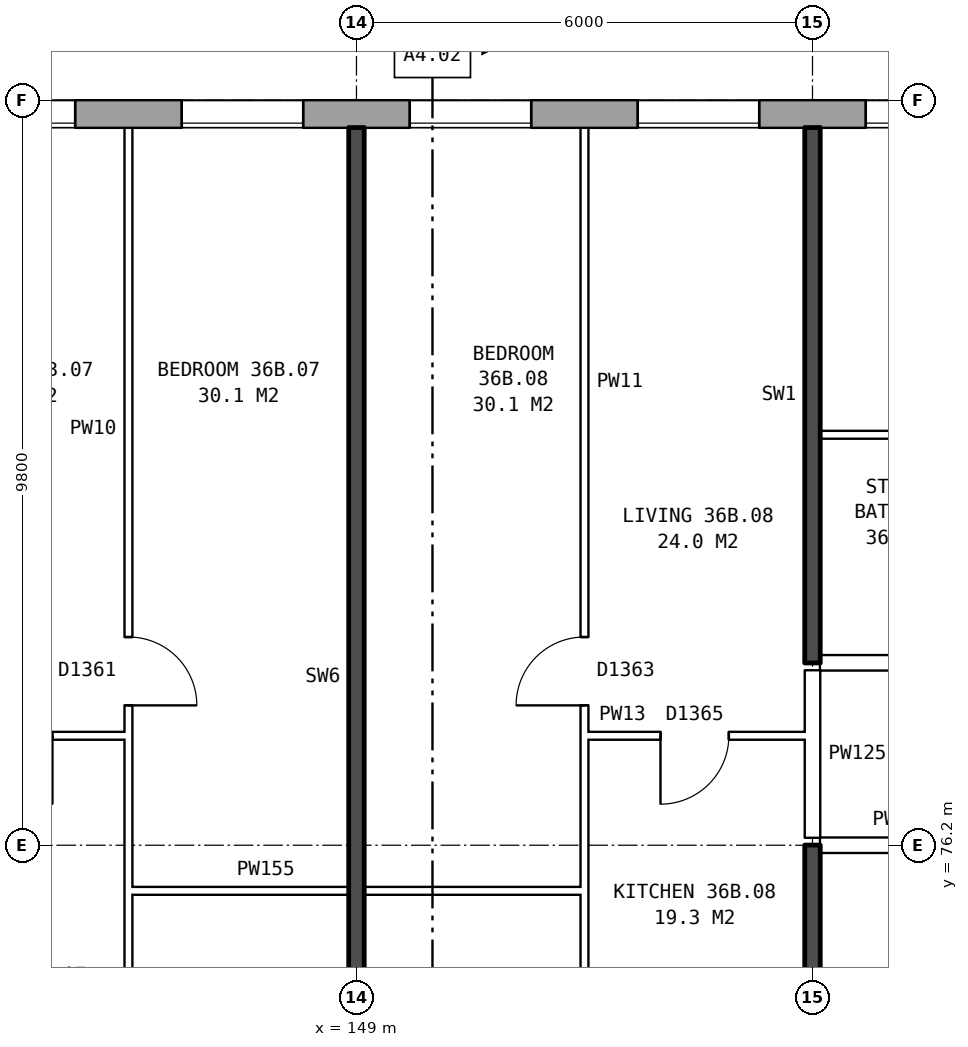
"""IFC4 building model, lengths in metres.
Left out: names, types, materials, properties, quantities, classifications, styles, units other than length and angle.
Written with IfcOpenShell. Run it as: python <this file> out.ifc"""

import sys

from ifc_helpers import new_model, si_unit, direction, frame, frame_2d, origin, place, context, subcontext, project, spatial, rectangle, extrude, element, fill, save


model = new_model("IFC4")
c1 = context("Model", 3, precision=1e-05, world=origin(), true_north=direction((0.0, 1.0)))
c2 = subcontext(c1, "Body", "Model", "MODEL_VIEW")
j1 = project(units=[si_unit("LENGTHUNIT", "METRE"), si_unit("PLANEANGLEUNIT", "RADIAN")], contexts=[c1])
p1 = place(None, origin())
s1 = spatial("IfcSite", under=j1, at=p1, CompositionType="ELEMENT")
p2 = place(p1, origin())
s2 = spatial("IfcBuilding", under=s1, at=p2, CompositionType="ELEMENT")
p3 = place(p2, frame((0.0, 0.0, 129.9)))
s3 = spatial("IfcBuildingStorey", under=s2, at=p3, CompositionType="ELEMENT", Elevation=129.9)
p4 = place(p3, frame((169.675, 85.82, 0.0), z_axis=(0.0, 0.0, 1.0), x_axis=(-1.0, 0.0, 0.0)))
e1 = element("IfcWall", 1, at=p4, inside=s3, PredefinedType="STANDARD", context=c2, shape_type="SweptSolid", body=[
    extrude(rectangle(XDim=35.601, YDim=0.36, at=frame_2d((17.8, 0.0))), origin(), (0.0, 0.0, 1.0), 2.85),
])
p5 = place(p4, frame((0.375, 0.0, 0.8)))
e2 = element("IfcOpeningElement", 2, at=p5, cuts=e1, PredefinedType="OPENING", context=c2, shape_type="SweptSolid", body=[
    extrude(rectangle(XDim=1.6, YDim=1.8, at=frame_2d((0.8, 0.9))), frame((0.0, 0.19, 0.0), z_axis=(0.0, -1.0, 0.0), x_axis=(1.0, 0.0, 0.0)), (0.0, 0.0, 1.0), 0.38),
])
p6 = place(p4, frame((3.375, 0.0, 0.8)))
e3 = element("IfcOpeningElement", 3, at=p6, cuts=e1, PredefinedType="OPENING", context=c2, shape_type="SweptSolid", body=[
    extrude(rectangle(XDim=1.6, YDim=1.8, at=frame_2d((0.8, 0.9))), frame((0.0, 0.19, 0.0), z_axis=(0.0, -1.0, 0.0), x_axis=(1.0, 0.0, 0.0)), (0.0, 0.0, 1.0), 0.38),
])
p7 = place(p4, frame((5.275, 0.0, 0.8)))
e4 = element("IfcOpeningElement", 4, at=p7, cuts=e1, PredefinedType="OPENING", context=c2, shape_type="SweptSolid", body=[
    extrude(rectangle(XDim=1.6, YDim=1.8, at=frame_2d((0.8, 0.9))), frame((0.0, 0.19, 0.0), z_axis=(0.0, -1.0, 0.0), x_axis=(1.0, 0.0, 0.0)), (0.0, 0.0, 1.0), 0.38),
])
p8 = place(p4, frame((9.375, 0.0, 0.8)))
e5 = element("IfcOpeningElement", 5, at=p8, cuts=e1, PredefinedType="OPENING", context=c2, shape_type="SweptSolid", body=[
    extrude(rectangle(XDim=1.6, YDim=1.8, at=frame_2d((0.8, 0.9))), frame((0.0, 0.19, 0.0), z_axis=(0.0, -1.0, 0.0), x_axis=(1.0, 0.0, 0.0)), (0.0, 0.0, 1.0), 0.38),
])
p9 = place(p4, frame((12.375, 0.0, 0.8)))
e6 = element("IfcOpeningElement", 6, at=p9, cuts=e1, PredefinedType="OPENING", context=c2, shape_type="SweptSolid", body=[
    extrude(rectangle(XDim=1.6, YDim=1.8, at=frame_2d((0.8, 0.9))), frame((0.0, 0.19, 0.0), z_axis=(0.0, -1.0, 0.0), x_axis=(1.0, 0.0, 0.0)), (0.0, 0.0, 1.0), 0.38),
])
p10 = place(p4, frame((15.375, 0.0, 0.8)))
e7 = element("IfcOpeningElement", 7, at=p10, cuts=e1, PredefinedType="OPENING", context=c2, shape_type="SweptSolid", body=[
    extrude(rectangle(XDim=1.6, YDim=1.8, at=frame_2d((0.8, 0.9))), frame((0.0, 0.19, 0.0), z_axis=(0.0, -1.0, 0.0), x_axis=(1.0, 0.0, 0.0)), (0.0, 0.0, 1.0), 0.38),
])
p11 = place(p4, frame((18.375, 0.0, 0.8)))
e8 = element("IfcOpeningElement", 8, at=p11, cuts=e1, PredefinedType="OPENING", context=c2, shape_type="SweptSolid", body=[
    extrude(rectangle(XDim=1.6, YDim=1.8, at=frame_2d((0.8, 0.9))), frame((0.0, 0.19, 0.0), z_axis=(0.0, -1.0, 0.0), x_axis=(1.0, 0.0, 0.0)), (0.0, 0.0, 1.0), 0.38),
])
p12 = place(p4, frame((21.375, 0.0, 0.8)))
e9 = element("IfcOpeningElement", 9, at=p12, cuts=e1, PredefinedType="OPENING", context=c2, shape_type="SweptSolid", body=[
    extrude(rectangle(XDim=1.6, YDim=1.8, at=frame_2d((0.8, 0.9))), frame((0.0, 0.19, 0.0), z_axis=(0.0, -1.0, 0.0), x_axis=(1.0, 0.0, 0.0)), (0.0, 0.0, 1.0), 0.38),
])
p13 = place(p4, frame((24.375, 0.0, 0.8)))
e10 = element("IfcOpeningElement", 10, at=p13, cuts=e1, PredefinedType="OPENING", context=c2, shape_type="SweptSolid", body=[
    extrude(rectangle(XDim=1.6, YDim=1.8, at=frame_2d((0.8, 0.9))), frame((0.0, 0.19, 0.0), z_axis=(0.0, -1.0, 0.0), x_axis=(1.0, 0.0, 0.0)), (0.0, 0.0, 1.0), 0.38),
])
p14 = place(p4, frame((27.825, 0.0, 1.7)))
e11 = element("IfcOpeningElement", 11, at=p14, cuts=e1, PredefinedType="OPENING", context=c2, shape_type="SweptSolid", body=[
    extrude(rectangle(XDim=0.6, YDim=0.9, at=frame_2d((0.3, 0.45))), frame((0.0, 0.19, 0.0), z_axis=(0.0, -1.0, 0.0), x_axis=(1.0, 0.0, 0.0)), (0.0, 0.0, 1.0), 0.38),
])
p15 = place(p4, frame((30.375, 0.0, 0.8)))
e12 = element("IfcOpeningElement", 12, at=p15, cuts=e1, PredefinedType="OPENING", context=c2, shape_type="SweptSolid", body=[
    extrude(rectangle(XDim=1.6, YDim=1.8, at=frame_2d((0.8, 0.9))), frame((0.0, 0.19, 0.0), z_axis=(0.0, -1.0, 0.0), x_axis=(1.0, 0.0, 0.0)), (0.0, 0.0, 1.0), 0.38),
])
p16 = place(p4, frame((33.375, 0.0, 0.8)))
e13 = element("IfcOpeningElement", 13, at=p16, cuts=e1, PredefinedType="OPENING", context=c2, shape_type="SweptSolid", body=[
    extrude(rectangle(XDim=1.6, YDim=1.8, at=frame_2d((0.8, 0.9))), frame((0.0, 0.19, 0.0), z_axis=(0.0, -1.0, 0.0), x_axis=(1.0, 0.0, 0.0)), (0.0, 0.0, 1.0), 0.38),
])
p17 = place(p4, frame((7.175, 0.0, 1.7)))
e14 = element("IfcOpeningElement", 14, at=p17, cuts=e1, PredefinedType="OPENING", context=c2, shape_type="SweptSolid", body=[
    extrude(rectangle(XDim=0.6, YDim=0.9, at=frame_2d((0.3, 0.45))), frame((0.0, 0.19, 0.0), z_axis=(0.0, -1.0, 0.0), x_axis=(1.0, 0.0, 0.0)), (0.0, 0.0, 1.0), 0.38),
])
p18 = place(p4, frame((28.725, 0.0, 0.8)))
e15 = element("IfcOpeningElement", 15, at=p18, cuts=e1, PredefinedType="OPENING", context=c2, shape_type="SweptSolid", body=[
    extrude(rectangle(XDim=1.2, YDim=1.8, at=frame_2d((0.6, 0.9))), frame((0.0, 0.19, 0.0), z_axis=(0.0, -1.0, 0.0), x_axis=(1.0, 0.0, 0.0)), (0.0, 0.0, 1.0), 0.38),
])
p19 = place(p3, frame((146.0, 75.6, 0.0), z_axis=(0.0, 0.0, 1.0), x_axis=(1.0, 0.0, 0.0)))
e16 = element("IfcWall", 16, at=p19, inside=s3, PredefinedType="PARTITIONING", context=c2, shape_type="SweptSolid", body=[
    extrude(rectangle(XDim=6.0, YDim=0.1, at=frame_2d((3.0, 0.0))), origin(), (0.0, 0.0, 1.0), 2.85),
])
p20 = place(p3, frame((155.1, 76.2, 0.0), z_axis=(0.0, 0.0, 1.0), x_axis=(1.0, 0.0, 0.0)))
e17 = element("IfcWall", 17, at=p20, inside=s3, PredefinedType="PARTITIONING", context=c2, shape_type="SweptSolid", body=[
    extrude(rectangle(XDim=2.14, YDim=0.2, at=frame_2d((1.07, 0.0))), origin(), (0.0, 0.0, 1.0), 2.85),
])
p21 = place(p3, frame((143.1, 77.64, 0.0), z_axis=(0.0, 0.0, 1.0), x_axis=(1.0, 0.0, 0.0)))
e18 = element("IfcWall", 18, at=p21, inside=s3, PredefinedType="PARTITIONING", context=c2, shape_type="SweptSolid", body=[
    extrude(rectangle(XDim=2.9, YDim=0.1, at=frame_2d((1.45, 0.0))), origin(), (0.0, 0.0, 1.0), 2.85),
])
p22 = place(p21, frame((1.0, 0.0, 0.0)))
e19 = element("IfcOpeningElement", 19, at=p22, cuts=e18, PredefinedType="OPENING", context=c2, shape_type="SweptSolid", body=[
    extrude(rectangle(XDim=0.9, YDim=2.1, at=frame_2d((0.45, 1.05))), frame((0.0, 0.06, 0.0), z_axis=(0.0, -1.0, 0.0), x_axis=(1.0, 0.0, 0.0)), (0.0, 0.0, 1.0), 0.12),
])
p23 = place(p3, frame((152.0, 77.64, 0.0), z_axis=(0.0, 0.0, 1.0), x_axis=(1.0, 0.0, 0.0)))
e20 = element("IfcWall", 20, at=p23, inside=s3, PredefinedType="PARTITIONING", context=c2, shape_type="SweptSolid", body=[
    extrude(rectangle(XDim=2.9, YDim=0.1, at=frame_2d((1.45, 0.0))), origin(), (0.0, 0.0, 1.0), 2.85),
])
p24 = place(p23, frame((1.0, 0.0, 0.0)))
e21 = element("IfcOpeningElement", 21, at=p24, cuts=e20, PredefinedType="OPENING", context=c2, shape_type="SweptSolid", body=[
    extrude(rectangle(XDim=0.9, YDim=2.1, at=frame_2d((0.45, 1.05))), frame((0.0, 0.06, 0.0), z_axis=(0.0, -1.0, 0.0), x_axis=(1.0, 0.0, 0.0)), (0.0, 0.0, 1.0), 0.12),
])
p25 = place(p3, frame((155.1, 78.6, 0.0), z_axis=(0.0, 0.0, 1.0), x_axis=(1.0, 0.0, 0.0)))
e22 = element("IfcWall", 22, at=p25, inside=s3, PredefinedType="PARTITIONING", context=c2, shape_type="SweptSolid", body=[
    extrude(rectangle(XDim=17.29, YDim=0.2, at=frame_2d((8.645, 0.0))), origin(), (0.0, 0.0, 1.0), 2.85),
])
p26 = place(p25, frame((3.6, 0.0, 0.0)))
e23 = element("IfcOpeningElement", 23, at=p26, cuts=e22, PredefinedType="OPENING", context=c2, shape_type="SweptSolid", body=[
    extrude(rectangle(XDim=1.0, YDim=2.1, at=frame_2d((0.5, 1.05))), frame((0.0, 0.11, 0.0), z_axis=(0.0, -1.0, 0.0), x_axis=(1.0, 0.0, 0.0)), (0.0, 0.0, 1.0), 0.22),
])
p27 = place(p25, frame((8.4, 0.0, 0.0)))
e24 = element("IfcOpeningElement", 24, at=p27, cuts=e22, PredefinedType="OPENING", context=c2, shape_type="SweptSolid", body=[
    extrude(rectangle(XDim=1.0, YDim=2.1, at=frame_2d((0.5, 1.05))), frame((0.0, 0.11, 0.0), z_axis=(0.0, -1.0, 0.0), x_axis=(1.0, 0.0, 0.0)), (0.0, 0.0, 1.0), 0.22),
])
p28 = place(p3, frame((155.1, 81.6, 0.0), z_axis=(0.0, 0.0, 1.0), x_axis=(1.0, 0.0, 0.0)))
e25 = element("IfcWall", 25, at=p28, inside=s3, PredefinedType="PARTITIONING", context=c2, shape_type="SweptSolid", body=[
    extrude(rectangle(XDim=2.3, YDim=0.1, at=frame_2d((1.15, 0.0))), origin(), (0.0, 0.0, 1.0), 2.85),
])
p29 = place(p3, frame((146.0, 71.3, 0.0), z_axis=(0.0, 0.0, 1.0), x_axis=(0.0, 1.0, 0.0)))
e26 = element("IfcWall", 26, at=p29, inside=s3, PredefinedType="PARTITIONING", context=c2, shape_type="SweptSolid", body=[
    extrude(rectangle(XDim=14.34, YDim=0.1, at=frame_2d((7.17, 0.0))), origin(), (0.0, 0.0, 1.0), 2.85),
])
p30 = place(p29, frame((6.74, 0.0, 0.0)))
e27 = element("IfcOpeningElement", 27, at=p30, cuts=e26, PredefinedType="OPENING", context=c2, shape_type="SweptSolid", body=[
    extrude(rectangle(XDim=0.9, YDim=2.1, at=frame_2d((0.45, 1.05))), frame((0.0, 0.06, 0.0), z_axis=(0.0, -1.0, 0.0), x_axis=(1.0, 0.0, 0.0)), (0.0, 0.0, 1.0), 0.12),
])
p31 = place(p29, frame((0.4, 0.0, 0.0)))
e28 = element("IfcOpeningElement", 28, at=p31, cuts=e26, PredefinedType="OPENING", context=c2, shape_type="SweptSolid", body=[
    extrude(rectangle(XDim=0.9, YDim=2.1, at=frame_2d((0.45, 1.05))), frame((0.0, 0.06, 0.0), z_axis=(0.0, -1.0, 0.0), x_axis=(1.0, 0.0, 0.0)), (0.0, 0.0, 1.0), 0.12),
])
p32 = place(p3, frame((149.0, 71.2, 0.0), z_axis=(0.0, 0.0, 1.0), x_axis=(0.0, 1.0, 0.0)))
e29 = element("IfcWall", 29, at=p32, inside=s3, PredefinedType="SOLIDWALL", context=c2, shape_type="SweptSolid", body=[
    extrude(rectangle(XDim=14.44, YDim=0.2, at=frame_2d((7.22, 0.0))), origin(), (0.0, 0.0, 1.0), 2.85),
])
p33 = place(p3, frame((152.0, 71.3, 0.0), z_axis=(0.0, 0.0, 1.0), x_axis=(0.0, 1.0, 0.0)))
e30 = element("IfcWall", 30, at=p33, inside=s3, PredefinedType="PARTITIONING", context=c2, shape_type="SweptSolid", body=[
    extrude(rectangle(XDim=14.34, YDim=0.1, at=frame_2d((7.17, 0.0))), origin(), (0.0, 0.0, 1.0), 2.85),
])
p34 = place(p33, frame((6.74, 0.0, 0.0)))
e31 = element("IfcOpeningElement", 31, at=p34, cuts=e30, PredefinedType="OPENING", context=c2, shape_type="SweptSolid", body=[
    extrude(rectangle(XDim=0.9, YDim=2.1, at=frame_2d((0.45, 1.05))), frame((0.0, 0.06, 0.0), z_axis=(0.0, -1.0, 0.0), x_axis=(1.0, 0.0, 0.0)), (0.0, 0.0, 1.0), 0.12),
])
p35 = place(p33, frame((0.4, 0.0, 0.0)))
e32 = element("IfcOpeningElement", 32, at=p35, cuts=e30, PredefinedType="OPENING", context=c2, shape_type="SweptSolid", body=[
    extrude(rectangle(XDim=0.9, YDim=2.1, at=frame_2d((0.45, 1.05))), frame((0.0, 0.06, 0.0), z_axis=(0.0, -1.0, 0.0), x_axis=(1.0, 0.0, 0.0)), (0.0, 0.0, 1.0), 0.12),
])
p36 = place(p3, frame((155.0, 71.2, 0.0), z_axis=(0.0, 0.0, 1.0), x_axis=(0.0, 1.0, 0.0)))
e33 = element("IfcWall", 33, at=p36, inside=s3, PredefinedType="SOLIDWALL", context=c2, shape_type="SweptSolid", body=[
    extrude(rectangle(XDim=5.0, YDim=0.2, at=frame_2d((2.5, 0.0))), origin(), (0.0, 0.0, 1.0), 2.85),
])
p37 = place(p3, frame((155.0, 76.3, 0.0), z_axis=(0.0, 0.0, 1.0), x_axis=(0.0, 1.0, 0.0)))
e34 = element("IfcWall", 34, at=p37, inside=s3, PredefinedType="PARTITIONING", context=c2, shape_type="SweptSolid", body=[
    extrude(rectangle(XDim=2.2, YDim=0.2, at=frame_2d((1.1, 0.0))), origin(), (0.0, 0.0, 1.0), 2.85),
])
p38 = place(p3, frame((155.0, 78.6, 0.0), z_axis=(0.0, 0.0, 1.0), x_axis=(0.0, 1.0, 0.0)))
e35 = element("IfcWall", 35, at=p38, inside=s3, PredefinedType="SOLIDWALL", context=c2, shape_type="SweptSolid", body=[
    extrude(rectangle(XDim=7.04, YDim=0.2, at=frame_2d((3.52, 0.0))), origin(), (0.0, 0.0, 1.0), 2.85),
])
p39 = place(p9, origin())
e36 = element("IfcWindow", 36, at=p39, inside=s3, PartitioningType="SINGLE_PANEL", PredefinedType="WINDOW", context=c2, shape_type="SweptSolid", body=[
    extrude(rectangle(XDim=1.6, YDim=1.8, at=frame_2d((0.8, 0.9))), frame((0.0, 0.15, 0.0), z_axis=(0.0, -1.0, 0.0), x_axis=(1.0, 0.0, 0.0)), (0.0, 0.0, 1.0), 0.06),
])
fill(e6, e36)
p40 = place(p10, origin())
e37 = element("IfcWindow", 37, at=p40, inside=s3, PartitioningType="SINGLE_PANEL", PredefinedType="WINDOW", context=c2, shape_type="SweptSolid", body=[
    extrude(rectangle(XDim=1.6, YDim=1.8, at=frame_2d((0.8, 0.9))), frame((0.0, 0.15, 0.0), z_axis=(0.0, -1.0, 0.0), x_axis=(1.0, 0.0, 0.0)), (0.0, 0.0, 1.0), 0.06),
])
fill(e7, e37)
p41 = place(p11, origin())
e38 = element("IfcWindow", 38, at=p41, inside=s3, PartitioningType="SINGLE_PANEL", PredefinedType="WINDOW", context=c2, shape_type="SweptSolid", body=[
    extrude(rectangle(XDim=1.6, YDim=1.8, at=frame_2d((0.8, 0.9))), frame((0.0, 0.15, 0.0), z_axis=(0.0, -1.0, 0.0), x_axis=(1.0, 0.0, 0.0)), (0.0, 0.0, 1.0), 0.06),
])
fill(e8, e38)
p42 = place(p12, origin())
e39 = element("IfcWindow", 39, at=p42, inside=s3, PartitioningType="SINGLE_PANEL", PredefinedType="WINDOW", context=c2, shape_type="SweptSolid", body=[
    extrude(rectangle(XDim=1.6, YDim=1.8, at=frame_2d((0.8, 0.9))), frame((0.0, 0.15, 0.0), z_axis=(0.0, -1.0, 0.0), x_axis=(1.0, 0.0, 0.0)), (0.0, 0.0, 1.0), 0.06),
])
fill(e9, e39)
p43 = place(p13, origin())
e40 = element("IfcWindow", 40, at=p43, inside=s3, PartitioningType="SINGLE_PANEL", PredefinedType="WINDOW", context=c2, shape_type="SweptSolid", body=[
    extrude(rectangle(XDim=1.6, YDim=1.8, at=frame_2d((0.8, 0.9))), frame((0.0, 0.15, 0.0), z_axis=(0.0, -1.0, 0.0), x_axis=(1.0, 0.0, 0.0)), (0.0, 0.0, 1.0), 0.06),
])
fill(e10, e40)
p44 = place(p30, frame((0.9, 0.0, 0.0), z_axis=(0.0, 0.0, 1.0), x_axis=(-1.0, 0.0, 0.0)))
e41 = element("IfcDoor", 41, at=p44, inside=s3, OperationType="SINGLE_SWING_RIGHT", PredefinedType="DOOR", context=c2, shape_type="SweptSolid", body=[
    extrude(rectangle(XDim=0.9, YDim=2.1, at=frame_2d((0.45, 1.05))), frame((0.0, 0.025, 0.0), z_axis=(0.0, -1.0, 0.0), x_axis=(1.0, 0.0, 0.0)), (0.0, 0.0, 1.0), 0.05),
])
fill(e27, e41)
p45 = place(p34, origin())
e42 = element("IfcDoor", 42, at=p45, inside=s3, OperationType="SINGLE_SWING_LEFT", PredefinedType="DOOR", context=c2, shape_type="SweptSolid", body=[
    extrude(rectangle(XDim=0.9, YDim=2.1, at=frame_2d((0.45, 1.05))), frame((0.0, 0.025, 0.0), z_axis=(0.0, -1.0, 0.0), x_axis=(1.0, 0.0, 0.0)), (0.0, 0.0, 1.0), 0.05),
])
fill(e31, e42)
p46 = place(p24, frame((0.9, 0.0, 0.0), z_axis=(0.0, 0.0, 1.0), x_axis=(-1.0, 0.0, 0.0)))
e43 = element("IfcDoor", 43, at=p46, inside=s3, OperationType="SINGLE_SWING_RIGHT", PredefinedType="DOOR", context=c2, shape_type="SweptSolid", body=[
    extrude(rectangle(XDim=0.9, YDim=2.1, at=frame_2d((0.45, 1.05))), frame((0.0, 0.025, 0.0), z_axis=(0.0, -1.0, 0.0), x_axis=(1.0, 0.0, 0.0)), (0.0, 0.0, 1.0), 0.05),
])
fill(e21, e43)
save(model, sys.argv[1])
